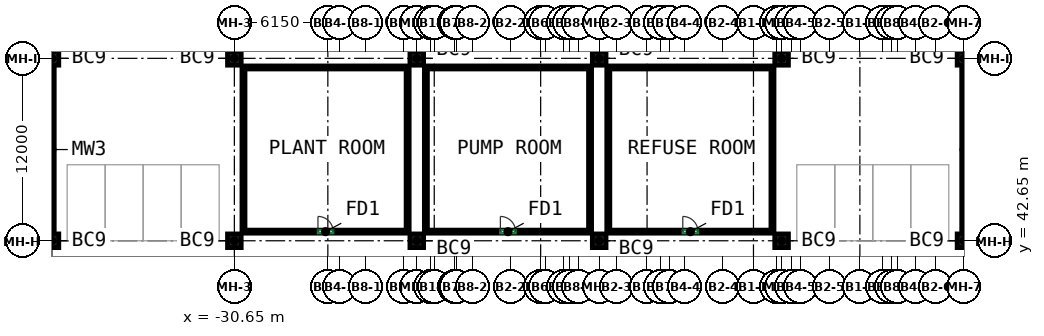
"""IFC4 building model, lengths in metres.
Left out: names, types, materials, properties, quantities, classifications, styles, units other than length and angle.
Written with IfcOpenShell. Run it as: python <this file> out.ifc"""

import sys

from ifc_helpers import new_model, si_unit, direction, frame, frame_2d, origin, origin_2d, place, context, subcontext, project, spatial, rectangle, extrude, source, transform, mapped, element, fill, save


model = new_model("IFC4")
c1 = context("Model", 3, precision=1e-05, world=origin(), true_north=direction((0.0, 1.0)))
c2 = subcontext(c1, "Body", "Model", "MODEL_VIEW")
j1 = project(units=[si_unit("LENGTHUNIT", "METRE"), si_unit("PLANEANGLEUNIT", "RADIAN")], contexts=[c1])
p1 = place(None, origin())
s1 = spatial("IfcSite", under=j1, at=p1, CompositionType="ELEMENT")
p2 = place(p1, origin())
s2 = spatial("IfcBuilding", under=s1, at=p2, CompositionType="ELEMENT")
p3 = place(p2, frame((0.0, 0.0, -4.5)))
s3 = spatial("IfcBuildingStorey", under=s2, at=p3, CompositionType="ELEMENT", Elevation=-4.5)
m1 = source(origin(), c2, "Body", "SweptSolid", [
    extrude(rectangle(XDim=11.1, YDim=0.3, at=frame_2d((5.55, 0.0))), origin(), (0.0, 0.0, 1.0), 4.09),
])
for number, where, z_axis, x_axis in (
    (1, (-42.65, 54.2, 0.0), (0.0, 0.0, 1.0), (0.0, -1.0, 0.0)),
    (2, (17.35, 54.2, 0.0), (0.0, 0.0, 1.0), (0.0, -1.0, 0.0)),
):
    element("IfcWall", number, at=place(p3, frame(where, z_axis=z_axis, x_axis=x_axis)), inside=s3, PredefinedType="SHEAR", context=c2, shape_type="MappedRepresentation", body=[
        mapped(m1, transform((0.0, 0.0, 0.0))),
    ])
m2 = source(origin(), c2, "Body", "SweptSolid", [
    extrude(rectangle(XDim=0.9, YDim=0.9, at=origin_2d()), origin(), (0.0, 0.0, 1.0), 4.5),
])
for number, where, z_axis, x_axis in (
    (3, (-42.65, 42.65, 0.0), (0.0, 0.0, 1.0), (1.0, 0.0, 0.0)),
    (4, (-42.65, 54.65, 0.0), (0.0, 0.0, 1.0), (1.0, 0.0, 0.0)),
    (5, (-30.65, 42.65, 0.0), (0.0, 0.0, 1.0), (1.0, 0.0, 0.0)),
    (6, (-30.65, 54.65, 0.0), (0.0, 0.0, 1.0), (1.0, 0.0, 0.0)),
    (7, (-18.65, 42.65, 0.0), (0.0, 0.0, 1.0), (1.0, 0.0, 0.0)),
    (8, (-18.65, 54.65, 0.0), (0.0, 0.0, 1.0), (1.0, 0.0, 0.0)),
    (9, (-6.65, 42.65, 0.0), (0.0, 0.0, 1.0), (1.0, 0.0, 0.0)),
    (10, (-6.65, 54.65, 0.0), (0.0, 0.0, 1.0), (1.0, 0.0, 0.0)),
    (11, (5.35, 42.65, 0.0), (0.0, 0.0, 1.0), (1.0, 0.0, 0.0)),
    (12, (5.35, 54.65, 0.0), (0.0, 0.0, 1.0), (1.0, 0.0, 0.0)),
    (13, (17.35, 42.65, 0.0), (0.0, 0.0, 1.0), (1.0, 0.0, 0.0)),
    (14, (17.35, 54.65, 0.0), (0.0, 0.0, 1.0), (1.0, 0.0, 0.0)),
):
    element("IfcColumn", number, at=place(p3, frame(where, z_axis=z_axis, x_axis=x_axis)), inside=s3, PredefinedType="COLUMN", context=c2, shape_type="MappedRepresentation", body=[
        mapped(m2, transform((0.0, 0.0, 0.0))),
    ])
m3 = source(origin(), c2, "Body", "SweptSolid", [
    extrude(rectangle(XDim=10.8, YDim=0.2, at=frame_2d((5.4, 0.0))), origin(), (0.0, 0.0, 1.0), 4.09),
])
p4 = place(p3, frame((-30.05, 43.25, 0.0), z_axis=(0.0, 0.0, 1.0), x_axis=(1.0, 0.0, 0.0)))
e15 = element("IfcWall", 15, at=p4, inside=s3, PredefinedType="PARTITIONING", context=c2, shape_type="MappedRepresentation", body=[
    mapped(m3, transform((0.0, 0.0, 0.0))),
])
p5 = place(p4, frame((4.9, 0.0, 0.0)))
e16 = element("IfcOpeningElement", 16, at=p5, cuts=e15, PredefinedType="OPENING", context=c2, shape_type="SweptSolid", body=[
    extrude(rectangle(XDim=1.0, YDim=2.1, at=frame_2d((0.5, 1.05))), frame((0.0, 0.11, 0.0), z_axis=(0.0, -1.0, 0.0), x_axis=(1.0, 0.0, 0.0)), (0.0, 0.0, 1.0), 0.22),
])
p6 = place(p3, frame((-30.05, 54.05, 0.0), z_axis=(0.0, 0.0, 1.0), x_axis=(1.0, 0.0, 0.0)))
e17 = element("IfcWall", 17, at=p6, inside=s3, PredefinedType="PARTITIONING", context=c2, shape_type="MappedRepresentation", body=[
    mapped(m3, transform((0.0, 0.0, 0.0))),
])
m4 = source(origin(), c2, "Body", "SweptSolid", [
    extrude(rectangle(XDim=10.6, YDim=0.2, at=frame_2d((5.3, 0.0))), origin(), (0.0, 0.0, 1.0), 4.09),
])
for number, where, z_axis, x_axis in (
    (18, (-30.05, 43.35, 0.0), (0.0, 0.0, 1.0), (0.0, 1.0, 0.0)),
    (19, (-19.25, 43.35, 0.0), (0.0, 0.0, 1.0), (0.0, 1.0, 0.0)),
):
    element("IfcWall", number, at=place(p3, frame(where, z_axis=z_axis, x_axis=x_axis)), inside=s3, PredefinedType="PARTITIONING", context=c2, shape_type="MappedRepresentation", body=[
        mapped(m4, transform((0.0, 0.0, 0.0))),
    ])
p7 = place(p3, frame((-18.05, 43.25, 0.0), z_axis=(0.0, 0.0, 1.0), x_axis=(1.0, 0.0, 0.0)))
e20 = element("IfcWall", 20, at=p7, inside=s3, PredefinedType="PARTITIONING", context=c2, shape_type="MappedRepresentation", body=[
    mapped(m3, transform((0.0, 0.0, 0.0))),
])
p8 = place(p7, frame((4.9, 0.0, 0.0)))
e21 = element("IfcOpeningElement", 21, at=p8, cuts=e20, PredefinedType="OPENING", context=c2, shape_type="SweptSolid", body=[
    extrude(rectangle(XDim=1.0, YDim=2.1, at=frame_2d((0.5, 1.05))), frame((0.0, 0.11, 0.0), z_axis=(0.0, -1.0, 0.0), x_axis=(1.0, 0.0, 0.0)), (0.0, 0.0, 1.0), 0.22),
])
p9 = place(p3, frame((-18.05, 54.05, 0.0), z_axis=(0.0, 0.0, 1.0), x_axis=(1.0, 0.0, 0.0)))
e22 = element("IfcWall", 22, at=p9, inside=s3, PredefinedType="PARTITIONING", context=c2, shape_type="MappedRepresentation", body=[
    mapped(m3, transform((0.0, 0.0, 0.0))),
])
for number, where, z_axis, x_axis in (
    (23, (-18.05, 43.35, 0.0), (0.0, 0.0, 1.0), (0.0, 1.0, 0.0)),
    (24, (-7.25, 43.35, 0.0), (0.0, 0.0, 1.0), (0.0, 1.0, 0.0)),
):
    element("IfcWall", number, at=place(p3, frame(where, z_axis=z_axis, x_axis=x_axis)), inside=s3, PredefinedType="PARTITIONING", context=c2, shape_type="MappedRepresentation", body=[
        mapped(m4, transform((0.0, 0.0, 0.0))),
    ])
p10 = place(p3, frame((-6.05, 43.25, 0.0), z_axis=(0.0, 0.0, 1.0), x_axis=(1.0, 0.0, 0.0)))
e25 = element("IfcWall", 25, at=p10, inside=s3, PredefinedType="PARTITIONING", context=c2, shape_type="MappedRepresentation", body=[
    mapped(m3, transform((0.0, 0.0, 0.0))),
])
p11 = place(p10, frame((4.9, 0.0, 0.0)))
e26 = element("IfcOpeningElement", 26, at=p11, cuts=e25, PredefinedType="OPENING", context=c2, shape_type="SweptSolid", body=[
    extrude(rectangle(XDim=1.0, YDim=2.1, at=frame_2d((0.5, 1.05))), frame((0.0, 0.11, 0.0), z_axis=(0.0, -1.0, 0.0), x_axis=(1.0, 0.0, 0.0)), (0.0, 0.0, 1.0), 0.22),
])
p12 = place(p3, frame((-6.05, 54.05, 0.0), z_axis=(0.0, 0.0, 1.0), x_axis=(1.0, 0.0, 0.0)))
e27 = element("IfcWall", 27, at=p12, inside=s3, PredefinedType="PARTITIONING", context=c2, shape_type="MappedRepresentation", body=[
    mapped(m3, transform((0.0, 0.0, 0.0))),
])
for number, where, z_axis, x_axis in (
    (28, (-6.05, 43.35, 0.0), (0.0, 0.0, 1.0), (0.0, 1.0, 0.0)),
    (29, (4.75, 43.35, 0.0), (0.0, 0.0, 1.0), (0.0, 1.0, 0.0)),
):
    element("IfcWall", number, at=place(p3, frame(where, z_axis=z_axis, x_axis=x_axis)), inside=s3, PredefinedType="PARTITIONING", context=c2, shape_type="MappedRepresentation", body=[
        mapped(m4, transform((0.0, 0.0, 0.0))),
    ])
p13 = place(p5, origin())
e30 = element("IfcDoor", 30, at=p13, inside=s3, OperationType="SINGLE_SWING_LEFT", PredefinedType="DOOR", context=c2, shape_type="SweptSolid", body=[
    extrude(rectangle(XDim=1.0, YDim=2.1, at=frame_2d((0.5, 1.05))), frame((0.0, 0.025, 0.0), z_axis=(0.0, -1.0, 0.0), x_axis=(1.0, 0.0, 0.0)), (0.0, 0.0, 1.0), 0.05),
])
fill(e16, e30)
p14 = place(p8, origin())
e31 = element("IfcDoor", 31, at=p14, inside=s3, OperationType="SINGLE_SWING_LEFT", PredefinedType="DOOR", context=c2, shape_type="SweptSolid", body=[
    extrude(rectangle(XDim=1.0, YDim=2.1, at=frame_2d((0.5, 1.05))), frame((0.0, 0.025, 0.0), z_axis=(0.0, -1.0, 0.0), x_axis=(1.0, 0.0, 0.0)), (0.0, 0.0, 1.0), 0.05),
])
fill(e21, e31)
p15 = place(p11, origin())
e32 = element("IfcDoor", 32, at=p15, inside=s3, OperationType="SINGLE_SWING_LEFT", PredefinedType="DOOR", context=c2, shape_type="SweptSolid", body=[
    extrude(rectangle(XDim=1.0, YDim=2.1, at=frame_2d((0.5, 1.05))), frame((0.0, 0.025, 0.0), z_axis=(0.0, -1.0, 0.0), x_axis=(1.0, 0.0, 0.0)), (0.0, 0.0, 1.0), 0.05),
])
fill(e26, e32)
save(model, sys.argv[1])
